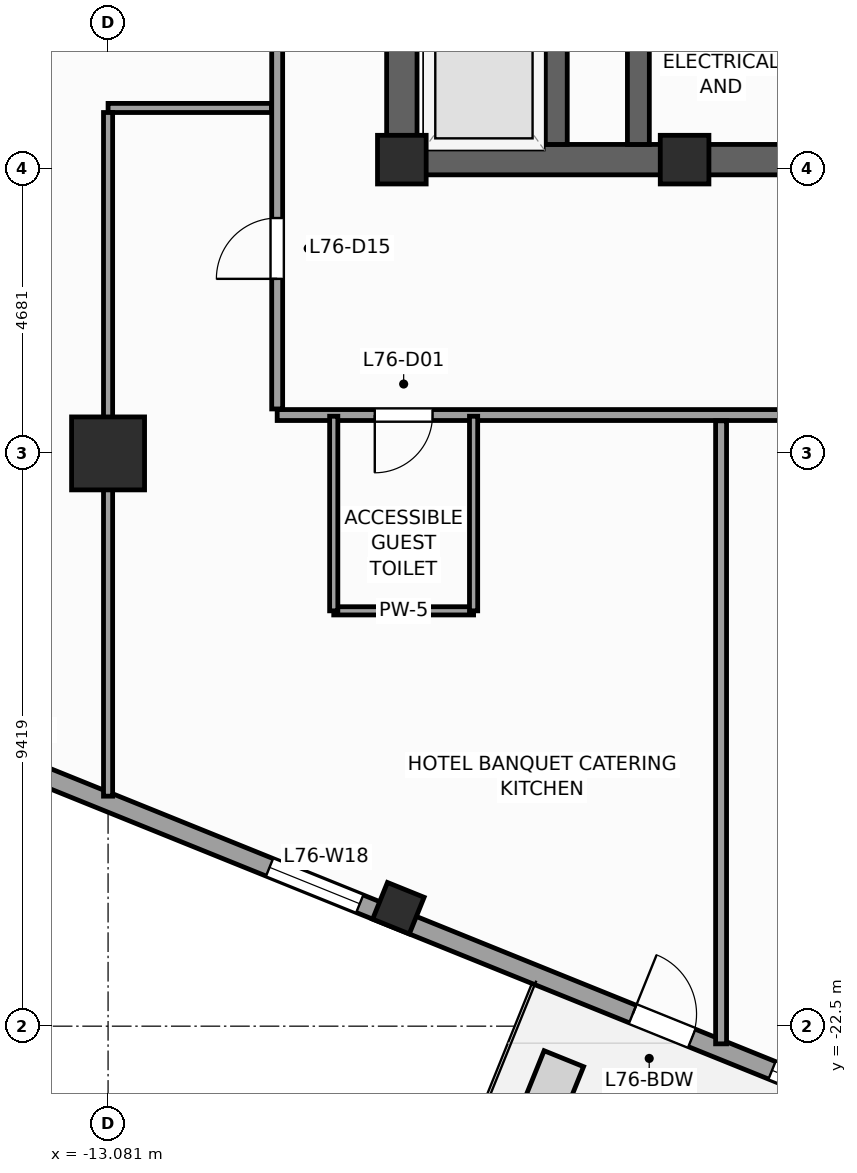
"""IFC4 building model, lengths in metres.
Left out: names, types, materials, properties, quantities, classifications, styles, units other than length and angle.
Written with IfcOpenShell. Run it as: python <this file> out.ifc"""

import sys

from ifc_helpers import new_model, si_unit, direction, frame, frame_2d, origin, origin_2d, place, context, subcontext, project, spatial, rectangle, extrude, source, transform, mapped, element, fill, save


model = new_model("IFC4")
c1 = context("Model", 3, precision=1e-05, world=origin(), true_north=direction((0.0, 1.0)))
c2 = subcontext(c1, "Body", "Model", "MODEL_VIEW")
j1 = project(units=[si_unit("LENGTHUNIT", "METRE"), si_unit("PLANEANGLEUNIT", "RADIAN")], contexts=[c1])
p1 = place(None, origin())
s1 = spatial("IfcSite", under=j1, at=p1, CompositionType="ELEMENT")
p2 = place(p1, origin())
s2 = spatial("IfcBuilding", under=s1, at=p2, CompositionType="ELEMENT")
p3 = place(p2, frame((0.0, 0.0, 308.4)))
s3 = spatial("IfcBuildingStorey", under=s2, at=p3, CompositionType="ELEMENT", Elevation=308.4)
p4 = place(p3, frame((-8.5, -8.25, 0.0), z_axis=(0.0, 0.0, 1.0), x_axis=(1.0, 0.0, 0.0)))
e1 = element("IfcWall", 1, at=p4, inside=s3, PredefinedType="SHEAR", context=c2, shape_type="SweptSolid", body=[
    extrude(rectangle(XDim=17.0, YDim=0.5, at=frame_2d((8.5, 0.0))), origin(), (0.0, 0.0, 1.0), 3.6),
])
p5 = place(p4, frame((7.85, 0.0, 0.0)))
e2 = element("IfcOpeningElement", 2, at=p5, cuts=e1, PredefinedType="OPENING", context=c2, shape_type="SweptSolid", body=[
    extrude(rectangle(XDim=1.3, YDim=2.2, at=frame_2d((0.65, 1.1))), frame((0.0, 0.26, 0.0), z_axis=(0.0, -1.0, 0.0), x_axis=(1.0, 0.0, 0.0)), (0.0, 0.0, 1.0), 0.52),
])
p6 = place(p3, frame((-8.25, -8.0, 0.0), z_axis=(0.0, 0.0, 1.0), x_axis=(0.0, 1.0, 0.0)))
e3 = element("IfcWall", 3, at=p6, inside=s3, PredefinedType="SHEAR", context=c2, shape_type="SweptSolid", body=[
    extrude(rectangle(XDim=16.0, YDim=0.5, at=frame_2d((8.0, 0.0))), origin(), (0.0, 0.0, 1.0), 3.6),
])
p7 = place(p6, frame((4.69, 0.0, 0.0)))
e4 = element("IfcOpeningElement", 4, at=p7, cuts=e3, PredefinedType="OPENING", context=c2, shape_type="SweptSolid", body=[
    extrude(rectangle(XDim=1.3, YDim=2.2, at=frame_2d((0.65, 1.1))), frame((0.0, 0.26, 0.0), z_axis=(0.0, -1.0, 0.0), x_axis=(1.0, 0.0, 0.0)), (0.0, 0.0, 1.0), 0.52),
])
p8 = place(p3, frame((-4.36, -8.0, 0.0), z_axis=(0.0, 0.0, 1.0), x_axis=(0.0, 1.0, 0.0)))
e5 = element("IfcWall", 5, at=p8, inside=s3, PredefinedType="SHEAR", context=c2, shape_type="SweptSolid", body=[
    extrude(rectangle(XDim=16.0, YDim=0.36, at=frame_2d((8.0, 0.0))), origin(), (0.0, 0.0, 1.0), 3.6),
])
p9 = place(p3, frame((-5.71, -8.0, 0.0), z_axis=(0.0, 0.0, 1.0), x_axis=(0.0, 1.0, 0.0)))
e6 = element("IfcWall", 6, at=p9, inside=s3, PredefinedType="SHEAR", context=c2, shape_type="SweptSolid", body=[
    extrude(rectangle(XDim=2.54, YDim=0.36, at=frame_2d((1.27, 0.0))), origin(), (0.0, 0.0, 1.0), 3.6),
])
m1 = source(origin(), c2, "Body", "SweptSolid", [
    extrude(rectangle(XDim=0.8, YDim=0.8, at=origin_2d()), origin(), (0.0, 0.0, 1.0), 3.6),
])
for number, where, z_axis, x_axis in (
    (7, (-8.25, -8.25, 0.0), (0.0, 0.0, 1.0), (1.0, 0.0, 0.0)),
    (8, (-3.6, -8.25, 0.0), (0.0, 0.0, 1.0), (1.0, 0.0, 0.0)),
):
    element("IfcColumn", number, at=place(p3, frame(where, z_axis=z_axis, x_axis=x_axis)), inside=s3, PredefinedType="PILASTER", context=c2, shape_type="MappedRepresentation", body=[
        mapped(m1, transform((0.0, 0.0, 0.0), scale=1.0)),
    ])
m2 = source(origin(), c2, "Body", "SweptSolid", [
    extrude(rectangle(XDim=1.2, YDim=1.2, at=origin_2d()), origin(), (0.0, 0.0, 1.0), 3.6),
])
p10 = place(p3, frame((-13.081, -13.081, 0.0), z_axis=(0.0, 0.0, 1.0), x_axis=(1.0, 0.0, 0.0)))
e9 = element("IfcColumn", 9, at=p10, inside=s3, PredefinedType="COLUMN", context=c2, shape_type="MappedRepresentation", body=[
    mapped(m2, transform((0.0, 0.0, 0.0), scale=1.0)),
])
m3 = source(origin(), c2, "Body", "SweptSolid", [
    extrude(rectangle(XDim=0.65, YDim=0.65, at=origin_2d()), origin(), (0.0, 0.0, 1.0), 3.6),
])
p11 = place(p3, frame((-8.307, -20.56, 0.0), z_axis=(0.0, 0.0, 1.0), x_axis=(0.374606593416, 0.927183854567, 0.0)))
e10 = element("IfcColumn", 10, at=p11, inside=s3, PredefinedType="COLUMN", context=c2, shape_type="MappedRepresentation", body=[
    mapped(m3, transform((0.0, 0.0, 0.0), scale=1.0)),
])
p12 = place(p3, frame((-23.813, -14.479, 0.0), z_axis=(0.0, 0.0, 1.0), x_axis=(0.927182657188, -0.374609557019, 0.0)))
e11 = element("IfcWall", 11, at=p12, inside=s3, PredefinedType="STANDARD", context=c2, shape_type="SweptSolid", body=[
    extrude(rectangle(XDim=33.31, YDim=0.31, at=frame_2d((16.655, 0.0))), origin(), (0.0, 0.0, 1.0), 2.75),
])
p13 = place(p12, frame((20.88, 0.0, 0.0)))
e12 = element("IfcOpeningElement", 12, at=p13, cuts=e11, PredefinedType="OPENING", context=c2, shape_type="SweptSolid", body=[
    extrude(rectangle(XDim=1.05, YDim=2.25, at=frame_2d((0.525, 1.125))), frame((0.0, 0.165, 0.0), z_axis=(0.0, -1.0, 0.0), x_axis=(1.0, 0.0, 0.0)), (0.0, 0.0, 1.0), 0.33),
])
p14 = place(p12, frame((3.197, 0.0, 0.47)))
e13 = element("IfcOpeningElement", 13, at=p14, cuts=e11, PredefinedType="OPENING", context=c2, shape_type="SweptSolid", body=[
    extrude(rectangle(XDim=1.6, YDim=2.1, at=frame_2d((0.8, 1.05))), frame((0.0, 0.165, 0.0), z_axis=(0.0, -1.0, 0.0), x_axis=(1.0, 0.0, 0.0)), (0.0, 0.0, 1.0), 0.33),
])
p15 = place(p12, frame((8.86, 0.0, 0.47)))
e14 = element("IfcOpeningElement", 14, at=p15, cuts=e11, PredefinedType="OPENING", context=c2, shape_type="SweptSolid", body=[
    extrude(rectangle(XDim=1.6, YDim=2.1, at=frame_2d((0.8, 1.05))), frame((0.0, 0.165, 0.0), z_axis=(0.0, -1.0, 0.0), x_axis=(1.0, 0.0, 0.0)), (0.0, 0.0, 1.0), 0.33),
])
p16 = place(p12, frame((14.439, 0.0, 0.47)))
e15 = element("IfcOpeningElement", 15, at=p16, cuts=e11, PredefinedType="OPENING", context=c2, shape_type="SweptSolid", body=[
    extrude(rectangle(XDim=1.6, YDim=2.1, at=frame_2d((0.8, 1.05))), frame((0.0, 0.165, 0.0), z_axis=(0.0, -1.0, 0.0), x_axis=(1.0, 0.0, 0.0)), (0.0, 0.0, 1.0), 0.33),
])
p17 = place(p12, frame((23.351, 0.0, 0.47)))
e16 = element("IfcOpeningElement", 16, at=p17, cuts=e11, PredefinedType="OPENING", context=c2, shape_type="SweptSolid", body=[
    extrude(rectangle(XDim=1.6, YDim=2.1, at=frame_2d((0.8, 1.05))), frame((0.0, 0.165, 0.0), z_axis=(0.0, -1.0, 0.0), x_axis=(1.0, 0.0, 0.0)), (0.0, 0.0, 1.0), 0.33),
])
p18 = place(p12, frame((29.347, 0.0, 0.47)))
e17 = element("IfcOpeningElement", 17, at=p18, cuts=e11, PredefinedType="OPENING", context=c2, shape_type="SweptSolid", body=[
    extrude(rectangle(XDim=1.6, YDim=2.1, at=frame_2d((0.8, 1.05))), frame((0.0, 0.165, 0.0), z_axis=(0.0, -1.0, 0.0), x_axis=(1.0, 0.0, 0.0)), (0.0, 0.0, 1.0), 0.33),
])
p19 = place(p3, frame((-10.3, -12.45, 0.0), z_axis=(0.0, 0.0, 1.0), x_axis=(1.0, 0.0, 0.0)))
e18 = element("IfcWall", 18, at=p19, inside=s3, PredefinedType="PARTITIONING", context=c2, shape_type="SweptSolid", body=[
    extrude(rectangle(XDim=20.6, YDim=0.18, at=frame_2d((10.3, 0.0))), origin(), (0.0, 0.0, 1.0), 3.35),
])
p20 = place(p19, frame((1.605, 0.0, 0.0)))
e19 = element("IfcOpeningElement", 19, at=p20, cuts=e18, PredefinedType="OPENING", context=c2, shape_type="SweptSolid", body=[
    extrude(rectangle(XDim=0.95, YDim=2.1, at=frame_2d((0.475, 1.05))), frame((0.0, 0.1, 0.0), z_axis=(0.0, -1.0, 0.0), x_axis=(1.0, 0.0, 0.0)), (0.0, 0.0, 1.0), 0.2),
])
p21 = place(p19, frame((16.036, 0.0, 0.0)))
e20 = element("IfcOpeningElement", 20, at=p21, cuts=e18, PredefinedType="OPENING", context=c2, shape_type="SweptSolid", body=[
    extrude(rectangle(XDim=1.0, YDim=2.15, at=frame_2d((0.5, 1.075))), frame((0.0, 0.1, 0.0), z_axis=(0.0, -1.0, 0.0), x_axis=(1.0, 0.0, 0.0)), (0.0, 0.0, 1.0), 0.2),
])
p22 = place(p19, frame((9.55, 0.0, 0.0)))
e21 = element("IfcOpeningElement", 21, at=p22, cuts=e18, PredefinedType="OPENING", context=c2, shape_type="SweptSolid", body=[
    extrude(rectangle(XDim=1.0, YDim=2.15, at=frame_2d((0.5, 1.075))), frame((0.0, 0.1, 0.0), z_axis=(0.0, -1.0, 0.0), x_axis=(1.0, 0.0, 0.0)), (0.0, 0.0, 1.0), 0.2),
])
p23 = place(p3, frame((-10.3, -12.35, 0.0), z_axis=(0.0, 0.0, 1.0), x_axis=(0.0, 1.0, 0.0)))
e22 = element("IfcWall", 22, at=p23, inside=s3, PredefinedType="PARTITIONING", context=c2, shape_type="SweptSolid", body=[
    extrude(rectangle(XDim=24.7, YDim=0.18, at=frame_2d((12.35, 0.0))), origin(), (0.0, 0.0, 1.0), 3.35),
])
p24 = place(p23, frame((16.15, 0.0, 0.0)))
e23 = element("IfcOpeningElement", 23, at=p24, cuts=e22, PredefinedType="OPENING", context=c2, shape_type="SweptSolid", body=[
    extrude(rectangle(XDim=1.0, YDim=2.15, at=frame_2d((0.5, 1.075))), frame((0.0, 0.1, 0.0), z_axis=(0.0, -1.0, 0.0), x_axis=(1.0, 0.0, 0.0)), (0.0, 0.0, 1.0), 0.2),
])
p25 = place(p23, frame((2.139, 0.0, 0.0)))
e24 = element("IfcOpeningElement", 24, at=p25, cuts=e22, PredefinedType="OPENING", context=c2, shape_type="SweptSolid", body=[
    extrude(rectangle(XDim=1.0, YDim=2.15, at=frame_2d((0.5, 1.075))), frame((0.0, 0.1, 0.0), z_axis=(0.0, -1.0, 0.0), x_axis=(1.0, 0.0, 0.0)), (0.0, 0.0, 1.0), 0.2),
])
p26 = place(p23, frame((6.35, 0.0, 0.0)))
e25 = element("IfcOpeningElement", 25, at=p26, cuts=e22, PredefinedType="OPENING", context=c2, shape_type="SweptSolid", body=[
    extrude(rectangle(XDim=1.0, YDim=2.15, at=frame_2d((0.5, 1.075))), frame((0.0, 0.1, 0.0), z_axis=(0.0, -1.0, 0.0), x_axis=(1.0, 0.0, 0.0)), (0.0, 0.0, 1.0), 0.2),
])
p27 = place(p23, frame((10.65, 0.0, 0.0)))
e26 = element("IfcOpeningElement", 26, at=p27, cuts=e22, PredefinedType="OPENING", context=c2, shape_type="SweptSolid", body=[
    extrude(rectangle(XDim=1.0, YDim=2.15, at=frame_2d((0.5, 1.075))), frame((0.0, 0.1, 0.0), z_axis=(0.0, -1.0, 0.0), x_axis=(1.0, 0.0, 0.0)), (0.0, 0.0, 1.0), 0.2),
])
p28 = place(p3, frame((-3.0, -12.545, 0.0), z_axis=(0.0, 0.0, 1.0), x_axis=(0.0, -1.0, 0.0)))
e27 = element("IfcWall", 27, at=p28, inside=s3, PredefinedType="PARTITIONING", context=c2, shape_type="SweptSolid", body=[
    extrude(rectangle(XDim=10.246, YDim=0.18, at=frame_2d((5.123, 0.0))), origin(), (0.0, 0.0, 1.0), 3.35),
])
p29 = place(p3, frame((-10.395, -7.4, 0.0), z_axis=(0.0, 0.0, 1.0), x_axis=(-1.0, 0.0, 0.0)))
e28 = element("IfcWall", 28, at=p29, inside=s3, PredefinedType="PARTITIONING", context=c2, shape_type="SweptSolid", body=[
    extrude(rectangle(XDim=2.686, YDim=0.15, at=frame_2d((1.343, 0.0))), origin(), (0.0, 0.0, 1.0), 3.35),
])
p30 = place(p3, frame((-13.081, -7.475, 0.0), z_axis=(0.0, 0.0, 1.0), x_axis=(0.0, -1.0, 0.0)))
e29 = element("IfcWall", 29, at=p30, inside=s3, PredefinedType="PARTITIONING", context=c2, shape_type="SweptSolid", body=[
    extrude(rectangle(XDim=11.243, YDim=0.15, at=frame_2d((5.621, 0.0))), origin(), (0.0, 0.0, 1.0), 2.45),
])
p31 = place(p3, frame((-9.37, -15.67, 0.0), z_axis=(0.0, 0.0, 1.0), x_axis=(1.0, 0.0, 0.0)))
e30 = element("IfcWall", 30, at=p31, inside=s3, PredefinedType="PARTITIONING", context=c2, shape_type="SweptSolid", body=[
    extrude(rectangle(XDim=2.3, YDim=0.135, at=frame_2d((1.15, 0.0))), origin(), (0.0, 0.0, 1.0), 2.95),
])
for number, where, z_axis, x_axis in (
    (31, (-7.07, -15.67, 0.0), (0.0, 0.0, 1.0), (0.0, 1.0, 0.0)),
    (32, (-9.37, -15.67, 0.0), (0.0, 0.0, 1.0), (0.0, 1.0, 0.0)),
):
    element("IfcWall", number, at=place(p3, frame(where, z_axis=z_axis, x_axis=x_axis)), inside=s3, PredefinedType="PARTITIONING", context=c2, shape_type="SweptSolid", body=[
        extrude(rectangle(XDim=3.2, YDim=0.135, at=frame_2d((1.6, 0.0))), origin(), (0.0, 0.0, 1.0), 3.35),
    ])
m4 = source(origin(), c2, "Body", "SweptSolid", [
    extrude(rectangle(XDim=1.05, YDim=2.25, at=frame_2d((0.525, 1.125))), frame((0.0, 0.025, 0.0), z_axis=(0.0, -1.0, 0.0), x_axis=(1.0, 0.0, 0.0)), (0.0, 0.0, 1.0), 0.05),
])
p32 = place(p13, origin())
e33 = element("IfcDoor", 33, at=p32, inside=s3, OperationType="SINGLE_SWING_LEFT", PredefinedType="DOOR", context=c2, shape_type="MappedRepresentation", body=[
    mapped(m4, transform((0.0, 0.0, 0.0), scale=1.0)),
])
fill(e12, e33)
m5 = source(origin(), c2, "Body", "SweptSolid", [
    extrude(rectangle(XDim=1.6, YDim=2.1, at=frame_2d((0.8, 1.05))), frame((0.0, 0.03, 0.0), z_axis=(0.0, -1.0, 0.0), x_axis=(1.0, 0.0, 0.0)), (0.0, 0.0, 1.0), 0.06),
])
p33 = place(p16, origin())
e34 = element("IfcWindow", 34, at=p33, inside=s3, PartitioningType="SINGLE_PANEL", PredefinedType="WINDOW", context=c2, shape_type="MappedRepresentation", body=[
    mapped(m5, transform((0.0, 0.0, 0.0), scale=1.0)),
])
fill(e15, e34)
p34 = place(p17, origin())
e35 = element("IfcWindow", 35, at=p34, inside=s3, PartitioningType="SINGLE_PANEL", PredefinedType="WINDOW", context=c2, shape_type="MappedRepresentation", body=[
    mapped(m5, transform((0.0, 0.0, 0.0), scale=1.0)),
])
fill(e16, e35)
m6 = source(origin(), c2, "Body", "SweptSolid", [
    extrude(rectangle(XDim=0.95, YDim=2.1, at=frame_2d((0.475, 1.05))), frame((0.0, 0.025, 0.0), z_axis=(0.0, -1.0, 0.0), x_axis=(1.0, 0.0, 0.0)), (0.0, 0.0, 1.0), 0.05),
])
p35 = place(p20, frame((0.95, 0.0, 0.0), z_axis=(0.0, 0.0, 1.0), x_axis=(-1.0, 0.0, 0.0)))
e36 = element("IfcDoor", 36, at=p35, inside=s3, OperationType="SINGLE_SWING_LEFT", PredefinedType="DOOR", context=c2, shape_type="MappedRepresentation", body=[
    mapped(m6, transform((0.0, 0.0, 0.0), scale=1.0)),
])
fill(e19, e36)
m7 = source(origin(), c2, "Body", "SweptSolid", [
    extrude(rectangle(XDim=1.0, YDim=2.15, at=frame_2d((0.5, 1.075))), frame((0.0, 0.025, 0.0), z_axis=(0.0, -1.0, 0.0), x_axis=(1.0, 0.0, 0.0)), (0.0, 0.0, 1.0), 0.05),
])
p36 = place(p25, origin())
e37 = element("IfcDoor", 37, at=p36, inside=s3, OperationType="SINGLE_SWING_LEFT", PredefinedType="DOOR", context=c2, shape_type="MappedRepresentation", body=[
    mapped(m7, transform((0.0, 0.0, 0.0), scale=1.0)),
])
fill(e24, e37)
save(model, sys.argv[1])
